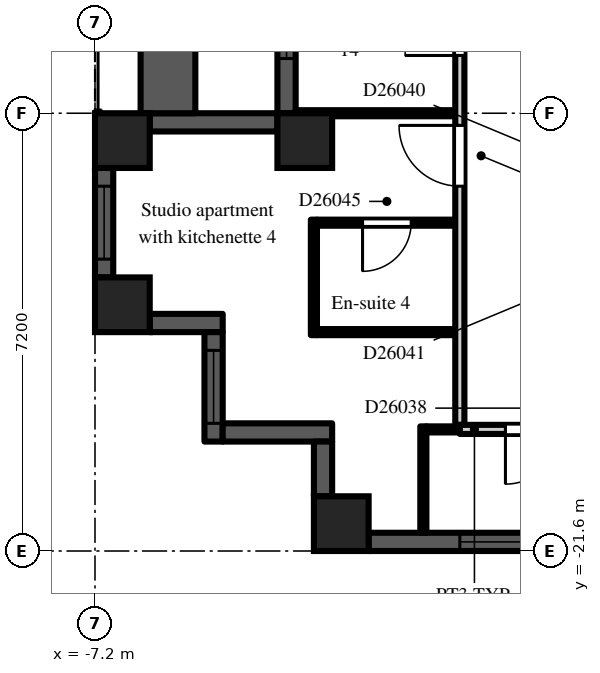
"""IFC4 building model, lengths in metres.
Left out: names, types, materials, properties, quantities, classifications, styles, units other than length and angle.
Written with IfcOpenShell. Run it as: python <this file> out.ifc"""

import sys

from ifc_helpers import new_model, si_unit, direction, frame, frame_2d, origin, origin_2d, place, context, subcontext, project, spatial, rectangle, extrude, element, fill, save


model = new_model("IFC4")
c1 = context("Model", 3, precision=1e-05, world=origin(), true_north=direction((0.0, 1.0)))
c2 = subcontext(c1, "Body", "Model", "MODEL_VIEW")
j1 = project(units=[si_unit("LENGTHUNIT", "METRE"), si_unit("PLANEANGLEUNIT", "RADIAN")], contexts=[c1])
p1 = place(None, origin())
s1 = spatial("IfcSite", under=j1, at=p1, CompositionType="ELEMENT")
p2 = place(p1, origin())
s2 = spatial("IfcBuilding", under=s1, at=p2, CompositionType="ELEMENT")
p3 = place(p2, frame((0.0, 0.0, 179.7)))
s3 = spatial("IfcBuildingStorey", under=s2, at=p3, CompositionType="ELEMENT", Elevation=179.7)
for number, where, z_axis, x_axis in (
    (1, (-6.75, -17.55, 0.0), (0.0, 0.0, 1.0), (1.0, 0.0, 0.0)),
    (2, (-6.75, -14.85, 0.0), (0.0, 0.0, 1.0), (1.0, 0.0, 0.0)),
    (3, (-3.75, -14.85, 0.0), (0.0, 0.0, 1.0), (1.0, 0.0, 0.0)),
    (4, (-3.15, -21.15, 0.0), (0.0, 0.0, 1.0), (1.0, 0.0, 0.0)),
):
    element("IfcColumn", number, at=place(p3, frame(where, z_axis=z_axis, x_axis=x_axis)), inside=s3, PredefinedType="COLUMN", context=c2, shape_type="SweptSolid", body=[
        extrude(rectangle(XDim=0.9, YDim=0.9, at=origin_2d()), origin(), (0.0, 0.0, 1.0), 3.0),
    ])
p4 = place(p3, frame((-4.05, -7.2, 0.0), z_axis=(0.0, 0.0, 1.0), x_axis=(0.0, -1.0, 0.0)))
e5 = element("IfcWall", 5, at=p4, inside=s3, PredefinedType="SOLIDWALL", context=c2, shape_type="SweptSolid", body=[
    extrude(rectangle(XDim=7.2, YDim=0.3, at=frame_2d((3.6, 0.0))), origin(), (0.0, 0.0, 1.0), 2.2),
])
p5 = place(p4, frame((3.0, 0.0, 0.0)))
e6 = element("IfcOpeningElement", 6, at=p5, cuts=e5, PredefinedType="OPENING", context=c2, shape_type="SweptSolid", body=[
    extrude(rectangle(XDim=1.2, YDim=2.05, at=frame_2d((0.6, 1.025))), frame((0.0, 0.16, 0.0), z_axis=(0.0, -1.0, 0.0), x_axis=(1.0, 0.0, 0.0)), (0.0, 0.0, 1.0), 0.32),
])
p6 = place(p4, frame((0.9, 0.0, 0.2)))
e7 = element("IfcOpeningElement", 7, at=p6, cuts=e5, PredefinedType="OPENING", context=c2, shape_type="SweptSolid", body=[
    extrude(rectangle(XDim=1.8, YDim=1.85, at=frame_2d((0.9, 0.925))), frame((0.0, 0.16, 0.0), z_axis=(0.0, -1.0, 0.0), x_axis=(1.0, 0.0, 0.0)), (0.0, 0.0, 1.0), 0.32),
])
p7 = place(p4, frame((4.5, 0.0, 0.2)))
e8 = element("IfcOpeningElement", 8, at=p7, cuts=e5, PredefinedType="OPENING", context=c2, shape_type="SweptSolid", body=[
    extrude(rectangle(XDim=1.8, YDim=1.85, at=frame_2d((0.9, 0.925))), frame((0.0, 0.16, 0.0), z_axis=(0.0, -1.0, 0.0), x_axis=(1.0, 0.0, 0.0)), (0.0, 0.0, 1.0), 0.32),
])
p8 = place(p3, frame((-4.2, -14.55, 0.0), z_axis=(0.0, 0.0, 1.0), x_axis=(-1.0, 0.0, 0.0)))
e9 = element("IfcWall", 9, at=p8, inside=s3, PredefinedType="SOLIDWALL", context=c2, shape_type="SweptSolid", body=[
    extrude(rectangle(XDim=2.1, YDim=0.3, at=frame_2d((1.05, 0.0))), origin(), (0.0, 0.0, 1.0), 2.2),
])
p9 = place(p3, frame((-7.05, -15.3, 0.0), z_axis=(0.0, 0.0, 1.0), x_axis=(0.0, -1.0, 0.0)))
e10 = element("IfcWall", 10, at=p9, inside=s3, PredefinedType="SOLIDWALL", context=c2, shape_type="SweptSolid", body=[
    extrude(rectangle(XDim=1.8, YDim=0.3, at=frame_2d((0.9, 0.0))), origin(), (0.0, 0.0, 1.0), 2.2),
])
p10 = place(p9, frame((0.3, 0.0, 0.2)))
e11 = element("IfcOpeningElement", 11, at=p10, cuts=e10, PredefinedType="OPENING", context=c2, shape_type="SweptSolid", body=[
    extrude(rectangle(XDim=1.2, YDim=1.85, at=frame_2d((0.6, 0.925))), frame((0.0, 0.16, 0.0), z_axis=(0.0, -1.0, 0.0), x_axis=(1.0, 0.0, 0.0)), (0.0, 0.0, 1.0), 0.32),
])
p11 = place(p3, frame((-6.3, -17.85, 0.0), z_axis=(0.0, 0.0, 1.0), x_axis=(1.0, 0.0, 0.0)))
e12 = element("IfcWall", 12, at=p11, inside=s3, PredefinedType="SOLIDWALL", context=c2, shape_type="SweptSolid", body=[
    extrude(rectangle(XDim=1.2, YDim=0.3, at=frame_2d((0.6, 0.0))), origin(), (0.0, 0.0, 1.0), 2.6),
])
p12 = place(p3, frame((-5.25, -18.0, 0.0), z_axis=(0.0, 0.0, 1.0), x_axis=(0.0, -1.0, 0.0)))
e13 = element("IfcWall", 13, at=p12, inside=s3, PredefinedType="SOLIDWALL", context=c2, shape_type="SweptSolid", body=[
    extrude(rectangle(XDim=1.8, YDim=0.3, at=frame_2d((0.9, 0.0))), origin(), (0.0, 0.0, 1.0), 2.6),
])
p13 = place(p12, frame((0.3, 0.0, 0.2)))
e14 = element("IfcOpeningElement", 14, at=p13, cuts=e13, PredefinedType="OPENING", context=c2, shape_type="SweptSolid", body=[
    extrude(rectangle(XDim=1.2, YDim=1.85, at=frame_2d((0.6, 0.925))), frame((0.0, 0.16, 0.0), z_axis=(0.0, -1.0, 0.0), x_axis=(1.0, 0.0, 0.0)), (0.0, 0.0, 1.0), 0.32),
])
p14 = place(p3, frame((-5.1, -19.65, 0.0), z_axis=(0.0, 0.0, 1.0), x_axis=(1.0, 0.0, 0.0)))
e15 = element("IfcWall", 15, at=p14, inside=s3, PredefinedType="SOLIDWALL", context=c2, shape_type="SweptSolid", body=[
    extrude(rectangle(XDim=1.8, YDim=0.3, at=frame_2d((0.9, 0.0))), origin(), (0.0, 0.0, 1.0), 2.6),
])
p15 = place(p3, frame((-3.45, -19.8, 0.0), z_axis=(0.0, 0.0, 1.0), x_axis=(0.0, -1.0, 0.0)))
e16 = element("IfcWall", 16, at=p15, inside=s3, PredefinedType="SOLIDWALL", context=c2, shape_type="SweptSolid", body=[
    extrude(rectangle(XDim=0.9, YDim=0.3, at=frame_2d((0.45, 0.0))), origin(), (0.0, 0.0, 1.0), 2.6),
])
p16 = place(p3, frame((-2.7, -21.45, 0.0), z_axis=(0.0, 0.0, 1.0), x_axis=(1.0, 0.0, 0.0)))
e17 = element("IfcWall", 17, at=p16, inside=s3, PredefinedType="SOLIDWALL", context=c2, shape_type="SweptSolid", body=[
    extrude(rectangle(XDim=5.4, YDim=0.3, at=frame_2d((2.7, 0.0))), origin(), (0.0, 0.0, 1.0), 2.2),
])
p17 = place(p16, frame((1.5, 0.0, 0.2)))
e18 = element("IfcOpeningElement", 18, at=p17, cuts=e17, PredefinedType="OPENING", context=c2, shape_type="SweptSolid", body=[
    extrude(rectangle(XDim=2.4, YDim=1.85, at=frame_2d((1.2, 0.925))), frame((0.0, 0.16, 0.0), z_axis=(0.0, -1.0, 0.0), x_axis=(1.0, 0.0, 0.0)), (0.0, 0.0, 1.0), 0.32),
])
p18 = place(p3, frame((-6.0, -14.4, 0.0), z_axis=(0.0, 0.0, 1.0), x_axis=(0.0, 1.0, 0.0)))
e19 = element("IfcWall", 19, at=p18, inside=s3, PredefinedType="PARAPET", context=c2, shape_type="SweptSolid", body=[
    extrude(rectangle(XDim=7.2, YDim=0.9, at=frame_2d((3.6, 0.0))), origin(), (0.0, 0.0, 1.0), 0.8),
])
p19 = place(p3, frame((-3.9, -14.4, 0.0), z_axis=(0.0, 0.0, 1.0), x_axis=(1.0, 0.0, 0.0)))
e20 = element("IfcWall", 20, at=p19, inside=s3, PredefinedType="PARTITIONING", context=c2, shape_type="SweptSolid", body=[
    extrude(rectangle(XDim=2.625, YDim=0.1, at=frame_2d((1.312, 0.0))), origin(), (0.0, 0.0, 1.0), 2.6),
])
p20 = place(p3, frame((-3.6, -18.05, 0.0), z_axis=(0.0, 0.0, 1.0), x_axis=(0.0, 1.0, 0.0)))
e21 = element("IfcWall", 21, at=p20, inside=s3, PredefinedType="PARTITIONING", context=c2, shape_type="SweptSolid", body=[
    extrude(rectangle(XDim=1.9, YDim=0.1, at=frame_2d((0.95, 0.0))), origin(), (0.0, 0.0, 1.0), 2.6),
])
p21 = place(p3, frame((-3.55, -18.0, 0.0), z_axis=(0.0, 0.0, 1.0), x_axis=(1.0, 0.0, 0.0)))
e22 = element("IfcWall", 22, at=p21, inside=s3, PredefinedType="PARTITIONING", context=c2, shape_type="SweptSolid", body=[
    extrude(rectangle(XDim=2.275, YDim=0.1, at=frame_2d((1.138, 0.0))), origin(), (0.0, 0.0, 1.0), 2.6),
])
p22 = place(p3, frame((-3.55, -16.2, 0.0), z_axis=(0.0, 0.0, 1.0), x_axis=(1.0, 0.0, 0.0)))
e23 = element("IfcWall", 23, at=p22, inside=s3, PredefinedType="PARTITIONING", context=c2, shape_type="SweptSolid", body=[
    extrude(rectangle(XDim=2.275, YDim=0.1, at=frame_2d((1.138, 0.0))), origin(), (0.0, 0.0, 1.0), 2.6),
])
p23 = place(p22, frame((0.75, 0.0, 0.0)))
e24 = element("IfcOpeningElement", 24, at=p23, cuts=e23, PredefinedType="OPENING", context=c2, shape_type="SweptSolid", body=[
    extrude(rectangle(XDim=0.8, YDim=2.1, at=frame_2d((0.4, 1.05))), frame((0.0, 0.06, 0.0), z_axis=(0.0, -1.0, 0.0), x_axis=(1.0, 0.0, 0.0)), (0.0, 0.0, 1.0), 0.12),
])
p24 = place(p3, frame((-1.8, -21.3, 0.0), z_axis=(0.0, 0.0, 1.0), x_axis=(0.0, 1.0, 0.0)))
e25 = element("IfcWall", 25, at=p24, inside=s3, PredefinedType="PARTITIONING", context=c2, shape_type="SweptSolid", body=[
    extrude(rectangle(XDim=1.75, YDim=0.1, at=frame_2d((0.875, 0.0))), origin(), (0.0, 0.0, 1.0), 2.6),
])
p25 = place(p3, frame((-1.75, -19.6, 0.0), z_axis=(0.0, 0.0, 1.0), x_axis=(1.0, 0.0, 0.0)))
e26 = element("IfcWall", 26, at=p25, inside=s3, PredefinedType="PARTITIONING", context=c2, shape_type="SweptSolid", body=[
    extrude(rectangle(XDim=0.55, YDim=0.1, at=frame_2d((0.275, 0.0))), origin(), (0.0, 0.0, 1.0), 2.6),
])
p26 = place(p3, frame((-1.2, -19.525, 0.0), z_axis=(0.0, 0.0, 1.0), x_axis=(0.0, 1.0, 0.0)))
e27 = element("IfcWall", 27, at=p26, inside=s3, PredefinedType="PARTITIONING", context=c2, shape_type="SweptSolid", body=[
    extrude(rectangle(XDim=18.25, YDim=0.15, at=frame_2d((9.125, 0.0))), origin(), (0.0, 0.0, 1.0), 2.6),
])
p27 = place(p26, frame((14.875, 0.0, 0.0)))
e28 = element("IfcOpeningElement", 28, at=p27, cuts=e27, PredefinedType="OPENING", context=c2, shape_type="SweptSolid", body=[
    extrude(rectangle(XDim=0.9, YDim=2.1, at=frame_2d((0.45, 1.05))), frame((0.0, 0.085, 0.0), z_axis=(0.0, -1.0, 0.0), x_axis=(1.0, 0.0, 0.0)), (0.0, 0.0, 1.0), 0.17),
])
p28 = place(p26, frame((6.075, 0.0, 0.0)))
e29 = element("IfcOpeningElement", 29, at=p28, cuts=e27, PredefinedType="OPENING", context=c2, shape_type="SweptSolid", body=[
    extrude(rectangle(XDim=0.9, YDim=2.1, at=frame_2d((0.45, 1.05))), frame((0.0, 0.085, 0.0), z_axis=(0.0, -1.0, 0.0), x_axis=(1.0, 0.0, 0.0)), (0.0, 0.0, 1.0), 0.17),
])
p29 = place(p26, frame((9.675, 0.0, 0.0)))
e30 = element("IfcOpeningElement", 30, at=p29, cuts=e27, PredefinedType="OPENING", context=c2, shape_type="SweptSolid", body=[
    extrude(rectangle(XDim=0.9, YDim=2.1, at=frame_2d((0.45, 1.05))), frame((0.0, 0.085, 0.0), z_axis=(0.0, -1.0, 0.0), x_axis=(1.0, 0.0, 0.0)), (0.0, 0.0, 1.0), 0.17),
])
p30 = place(p26, frame((3.925, 0.0, 0.0)))
e31 = element("IfcOpeningElement", 31, at=p30, cuts=e27, PredefinedType="OPENING", context=c2, shape_type="SweptSolid", body=[
    extrude(rectangle(XDim=1.0, YDim=2.1, at=frame_2d((0.5, 1.05))), frame((0.0, 0.085, 0.0), z_axis=(0.0, -1.0, 0.0), x_axis=(1.0, 0.0, 0.0)), (0.0, 0.0, 1.0), 0.17),
])
p31 = place(p3, frame((-1.2, -19.6, 0.0), z_axis=(0.0, 0.0, 1.0), x_axis=(1.0, 0.0, 0.0)))
e32 = element("IfcWall", 32, at=p31, inside=s3, PredefinedType="PARTITIONING", context=c2, shape_type="SweptSolid", body=[
    extrude(rectangle(XDim=2.4, YDim=0.15, at=frame_2d((1.2, 0.0))), origin(), (0.0, 0.0, 1.0), 2.6),
])
p32 = place(p31, frame((0.75, 0.0, 0.0)))
e33 = element("IfcOpeningElement", 33, at=p32, cuts=e32, PredefinedType="OPENING", context=c2, shape_type="SweptSolid", body=[
    extrude(rectangle(XDim=0.9, YDim=2.1, at=frame_2d((0.45, 1.05))), frame((0.0, 0.085, 0.0), z_axis=(0.0, -1.0, 0.0), x_axis=(1.0, 0.0, 0.0)), (0.0, 0.0, 1.0), 0.17),
])
p33 = place(p7, origin())
e34 = element("IfcWindow", 34, at=p33, inside=s3, PartitioningType="SINGLE_PANEL", PredefinedType="WINDOW", context=c2, shape_type="SweptSolid", body=[
    extrude(rectangle(XDim=1.8, YDim=1.85, at=frame_2d((0.9, 0.925))), frame((0.0, 0.03, 0.0), z_axis=(0.0, -1.0, 0.0), x_axis=(1.0, 0.0, 0.0)), (0.0, 0.0, 1.0), 0.06),
])
fill(e8, e34)
p34 = place(p10, origin())
e35 = element("IfcWindow", 35, at=p34, inside=s3, PartitioningType="SINGLE_PANEL", PredefinedType="WINDOW", context=c2, shape_type="SweptSolid", body=[
    extrude(rectangle(XDim=1.2, YDim=1.85, at=frame_2d((0.6, 0.925))), frame((0.0, 0.03, 0.0), z_axis=(0.0, -1.0, 0.0), x_axis=(1.0, 0.0, 0.0)), (0.0, 0.0, 1.0), 0.06),
])
fill(e11, e35)
p35 = place(p13, origin())
e36 = element("IfcWindow", 36, at=p35, inside=s3, PartitioningType="SINGLE_PANEL", PredefinedType="WINDOW", context=c2, shape_type="SweptSolid", body=[
    extrude(rectangle(XDim=1.2, YDim=1.85, at=frame_2d((0.6, 0.925))), frame((0.0, 0.03, 0.0), z_axis=(0.0, -1.0, 0.0), x_axis=(1.0, 0.0, 0.0)), (0.0, 0.0, 1.0), 0.06),
])
fill(e14, e36)
p36 = place(p17, origin())
e37 = element("IfcWindow", 37, at=p36, inside=s3, PartitioningType="SINGLE_PANEL", PredefinedType="WINDOW", context=c2, shape_type="SweptSolid", body=[
    extrude(rectangle(XDim=2.4, YDim=1.85, at=frame_2d((1.2, 0.925))), frame((0.0, 0.03, 0.0), z_axis=(0.0, -1.0, 0.0), x_axis=(1.0, 0.0, 0.0)), (0.0, 0.0, 1.0), 0.06),
])
fill(e18, e37)
p37 = place(p32, frame((0.9, 0.0, 0.0), z_axis=(0.0, 0.0, 1.0), x_axis=(-1.0, 0.0, 0.0)))
e38 = element("IfcDoor", 38, at=p37, inside=s3, OperationType="SINGLE_SWING_RIGHT", PredefinedType="DOOR", context=c2, shape_type="SweptSolid", body=[
    extrude(rectangle(XDim=0.9, YDim=2.1, at=frame_2d((0.45, 1.05))), frame((0.0, 0.025, 0.0), z_axis=(0.0, -1.0, 0.0), x_axis=(1.0, 0.0, 0.0)), (0.0, 0.0, 1.0), 0.05),
])
fill(e33, e38)
p38 = place(p28, origin())
e39 = element("IfcDoor", 39, at=p38, inside=s3, OperationType="SINGLE_SWING_LEFT", PredefinedType="DOOR", context=c2, shape_type="SweptSolid", body=[
    extrude(rectangle(XDim=0.9, YDim=2.1, at=frame_2d((0.45, 1.05))), frame((0.0, 0.025, 0.0), z_axis=(0.0, -1.0, 0.0), x_axis=(1.0, 0.0, 0.0)), (0.0, 0.0, 1.0), 0.05),
])
fill(e29, e39)
p39 = place(p23, frame((0.8, 0.0, 0.0), z_axis=(0.0, 0.0, 1.0), x_axis=(-1.0, 0.0, 0.0)))
e40 = element("IfcDoor", 40, at=p39, inside=s3, OperationType="SINGLE_SWING_RIGHT", PredefinedType="DOOR", context=c2, shape_type="SweptSolid", body=[
    extrude(rectangle(XDim=0.8, YDim=2.1, at=frame_2d((0.4, 1.05))), frame((0.0, 0.025, 0.0), z_axis=(0.0, -1.0, 0.0), x_axis=(1.0, 0.0, 0.0)), (0.0, 0.0, 1.0), 0.05),
])
fill(e24, e40)
p40 = place(p30, origin())
e41 = element("IfcDoor", 41, at=p40, inside=s3, OperationType="SINGLE_SWING_RIGHT", PredefinedType="DOOR", context=c2, shape_type="SweptSolid", body=[
    extrude(rectangle(XDim=1.0, YDim=2.1, at=frame_2d((0.5, 1.05))), frame((0.0, 0.025, 0.0), z_axis=(0.0, -1.0, 0.0), x_axis=(1.0, 0.0, 0.0)), (0.0, 0.0, 1.0), 0.05),
])
fill(e31, e41)
save(model, sys.argv[1])
